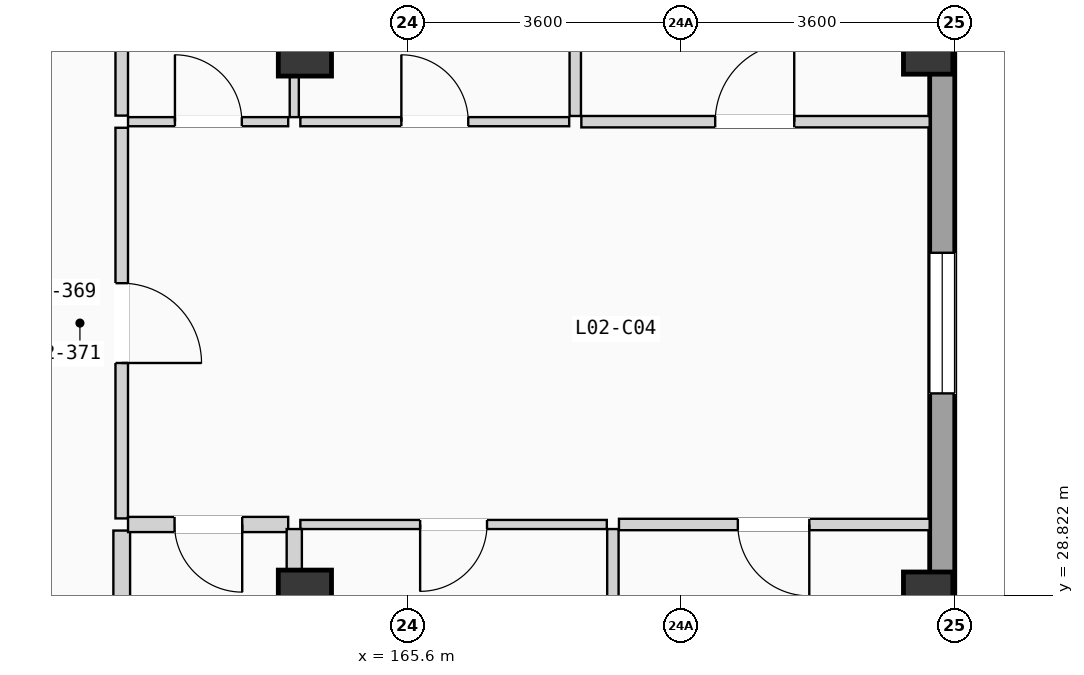
"""IFC4 building model, lengths in metres.
Left out: names, types, materials, properties, quantities, classifications, styles, units other than length and angle.
Written with IfcOpenShell. Run it as: python <this file> out.ifc"""

import sys

from ifc_helpers import new_model, si_unit, direction, frame, frame_2d, origin, origin_2d, place, context, subcontext, project, spatial, rectangle, extrude, element, fill, save


model = new_model("IFC4")
c1 = context("Model", 3, precision=1e-05, world=origin(), true_north=direction((0.0, 1.0)))
c2 = subcontext(c1, "Body", "Model", "MODEL_VIEW")
j1 = project(units=[si_unit("LENGTHUNIT", "METRE"), si_unit("PLANEANGLEUNIT", "RADIAN")], contexts=[c1])
p1 = place(None, origin())
s1 = spatial("IfcSite", under=j1, at=p1, CompositionType="ELEMENT")
p2 = place(p1, origin())
s2 = spatial("IfcBuilding", under=s1, at=p2, CompositionType="ELEMENT")
p3 = place(p2, frame((0.0, 0.0, 8.575)))
s3 = spatial("IfcBuildingStorey", under=s2, at=p3, CompositionType="ELEMENT", Elevation=8.575)
for number, where, z_axis, x_axis in (
    (1, (164.25, 28.8, 0.0), (0.0, 0.0, 1.0), (1.0, 0.0, 0.0)),
    (2, (164.25, 36.0, 0.0), (0.0, 0.0, 1.0), (1.0, 0.0, 0.0)),
):
    element("IfcColumn", number, at=place(p3, frame(where, z_axis=z_axis, x_axis=x_axis)), inside=s3, PredefinedType="COLUMN", context=c2, shape_type="SweptSolid", body=[
        extrude(rectangle(XDim=0.7, YDim=0.7, at=origin_2d()), origin(), (0.0, 0.0, 1.0), 3.5),
    ])
for number, where, z_axis, x_axis in (
    (3, (172.45, 28.8, 0.0), (0.0, 0.0, 1.0), (1.0, 0.0, 0.0)),
    (4, (172.45, 36.0, 0.0), (0.0, 0.0, 1.0), (1.0, 0.0, 0.0)),
):
    element("IfcColumn", number, at=place(p3, frame(where, z_axis=z_axis, x_axis=x_axis)), inside=s3, PredefinedType="COLUMN", context=c2, shape_type="SweptSolid", body=[
        extrude(rectangle(XDim=0.65, YDim=0.65, at=origin_2d()), origin(), (0.0, 0.0, 1.0), 3.5),
    ])
p4 = place(p3, frame((172.635, 0.33, 0.0), z_axis=(0.0, 0.0, 1.0), x_axis=(0.0, 1.0, 0.0)))
e5 = element("IfcWall", 5, at=p4, inside=s3, PredefinedType="SOLIDWALL", context=c2, shape_type="SweptSolid", body=[
    extrude(rectangle(XDim=49.74, YDim=0.33, at=frame_2d((24.87, 0.0))), origin(), (0.0, 0.0, 1.0), 3.24),
])
p5 = place(p4, frame((11.709, 0.0, 0.9)))
e6 = element("IfcOpeningElement", 6, at=p5, cuts=e5, PredefinedType="OPENING", context=c2, shape_type="SweptSolid", body=[
    extrude(rectangle(XDim=1.85, YDim=1.2, at=frame_2d((0.925, 0.6))), frame((0.0, 0.175, 0.0), z_axis=(0.0, -1.0, 0.0), x_axis=(1.0, 0.0, 0.0)), (0.0, 0.0, 1.0), 0.35),
])
p6 = place(p4, frame((8.364, 0.0, 0.9)))
e7 = element("IfcOpeningElement", 7, at=p6, cuts=e5, PredefinedType="OPENING", context=c2, shape_type="SweptSolid", body=[
    extrude(rectangle(XDim=1.85, YDim=1.35, at=frame_2d((0.925, 0.675))), frame((0.0, 0.175, 0.0), z_axis=(0.0, -1.0, 0.0), x_axis=(1.0, 0.0, 0.0)), (0.0, 0.0, 1.0), 0.35),
])
p7 = place(p4, frame((17.612, 0.0, 0.9)))
e8 = element("IfcOpeningElement", 8, at=p7, cuts=e5, PredefinedType="OPENING", context=c2, shape_type="SweptSolid", body=[
    extrude(rectangle(XDim=1.85, YDim=1.5, at=frame_2d((0.925, 0.75))), frame((0.0, 0.175, 0.0), z_axis=(0.0, -1.0, 0.0), x_axis=(1.0, 0.0, 0.0)), (0.0, 0.0, 1.0), 0.35),
])
p8 = place(p4, frame((31.145, 0.0, 0.9)))
e9 = element("IfcOpeningElement", 9, at=p8, cuts=e5, PredefinedType="OPENING", context=c2, shape_type="SweptSolid", body=[
    extrude(rectangle(XDim=1.85, YDim=1.65, at=frame_2d((0.925, 0.825))), frame((0.0, 0.175, 0.0), z_axis=(0.0, -1.0, 0.0), x_axis=(1.0, 0.0, 0.0)), (0.0, 0.0, 1.0), 0.35),
])
p9 = place(p4, frame((23.945, 0.0, 0.755)))
e10 = element("IfcOpeningElement", 10, at=p9, cuts=e5, PredefinedType="OPENING", context=c2, shape_type="SweptSolid", body=[
    extrude(rectangle(XDim=1.85, YDim=1.8, at=frame_2d((0.925, 0.9))), frame((0.0, 0.175, 0.0), z_axis=(0.0, -1.0, 0.0), x_axis=(1.0, 0.0, 0.0)), (0.0, 0.0, 1.0), 0.35),
])
p10 = place(p4, frame((38.205, 0.0, 0.9)))
e11 = element("IfcOpeningElement", 11, at=p10, cuts=e5, PredefinedType="OPENING", context=c2, shape_type="SweptSolid", body=[
    extrude(rectangle(XDim=2.0, YDim=1.2, at=frame_2d((1.0, 0.6))), frame((0.0, 0.175, 0.0), z_axis=(0.0, -1.0, 0.0), x_axis=(1.0, 0.0, 0.0)), (0.0, 0.0, 1.0), 0.35),
])
p11 = place(p3, frame((161.84, 29.83, 0.0), z_axis=(0.0, 0.0, 1.0), x_axis=(0.0, 1.0, 0.0)))
e12 = element("IfcWall", 12, at=p11, inside=s3, PredefinedType="PARTITIONING", context=c2, shape_type="SweptSolid", body=[
    extrude(rectangle(XDim=5.14, YDim=0.165, at=frame_2d((2.57, 0.0))), origin(), (0.0, 0.0, 1.0), 3.22),
])
p12 = place(p11, frame((2.045, 0.0, 0.0)))
e13 = element("IfcOpeningElement", 13, at=p12, cuts=e12, PredefinedType="OPENING", context=c2, shape_type="SweptSolid", body=[
    extrude(rectangle(XDim=1.05, YDim=2.13, at=frame_2d((0.525, 1.065))), frame((0.0, 0.093, 0.0), z_axis=(0.0, -1.0, 0.0), x_axis=(1.0, 0.0, 0.0)), (0.0, 0.0, 1.0), 0.185),
])
p13 = place(p3, frame((161.84, 21.066, 0.0), z_axis=(0.0, 0.0, 1.0), x_axis=(0.0, 1.0, 0.0)))
e14 = element("IfcWall", 14, at=p13, inside=s3, PredefinedType="PLUMBINGWALL", context=c2, shape_type="SweptSolid", body=[
    extrude(rectangle(XDim=8.604, YDim=0.22, at=frame_2d((4.302, 0.0))), origin(), (0.0, 0.0, 1.0), 3.22),
])
p14 = place(p3, frame((161.84, 35.13, 0.0), z_axis=(0.0, 0.0, 1.0), x_axis=(0.0, 1.0, 0.0)))
e15 = element("IfcWall", 15, at=p14, inside=s3, PredefinedType="PARTITIONING", context=c2, shape_type="SweptSolid", body=[
    extrude(rectangle(XDim=7.67, YDim=0.165, at=frame_2d((3.835, 0.0))), origin(), (0.0, 0.0, 1.0), 3.22),
])
p15 = place(p3, frame((161.923, 29.75, 0.0), z_axis=(0.0, 0.0, 1.0), x_axis=(1.0, 0.0, 0.0)))
e16 = element("IfcWall", 16, at=p15, inside=s3, PredefinedType="PLUMBINGWALL", context=c2, shape_type="SweptSolid", body=[
    extrude(rectangle(XDim=2.107, YDim=0.2, at=frame_2d((1.053, 0.0))), origin(), (0.0, 0.0, 1.0), 3.22),
])
p16 = place(p15, frame((0.612, 0.0, 0.0)))
e17 = element("IfcOpeningElement", 17, at=p16, cuts=e16, PredefinedType="OPENING", context=c2, shape_type="SweptSolid", body=[
    extrude(rectangle(XDim=0.89, YDim=2.03, at=frame_2d((0.445, 1.015))), frame((0.0, 0.11, 0.0), z_axis=(0.0, -1.0, 0.0), x_axis=(1.0, 0.0, 0.0)), (0.0, 0.0, 1.0), 0.22),
])
p17 = place(p3, frame((161.923, 35.05, 0.0), z_axis=(0.0, 0.0, 1.0), x_axis=(1.0, 0.0, 0.0)))
e18 = element("IfcWall", 18, at=p17, inside=s3, PredefinedType="PARTITIONING", context=c2, shape_type="SweptSolid", body=[
    extrude(rectangle(XDim=2.107, YDim=0.12, at=frame_2d((1.053, 0.0))), origin(), (0.0, 0.0, 1.0), 3.22),
])
p18 = place(p17, frame((0.617, 0.0, 0.0)))
e19 = element("IfcOpeningElement", 19, at=p18, cuts=e18, PredefinedType="OPENING", context=c2, shape_type="SweptSolid", body=[
    extrude(rectangle(XDim=0.88, YDim=2.02, at=frame_2d((0.44, 1.01))), frame((0.0, 0.07, 0.0), z_axis=(0.0, -1.0, 0.0), x_axis=(1.0, 0.0, 0.0)), (0.0, 0.0, 1.0), 0.14),
])
p19 = place(p3, frame((168.382, 29.75, 0.0), z_axis=(0.0, 0.0, 1.0), x_axis=(1.0, 0.0, 0.0)))
e20 = element("IfcWall", 20, at=p19, inside=s3, PredefinedType="PARTITIONING", context=c2, shape_type="SweptSolid", body=[
    extrude(rectangle(XDim=4.088, YDim=0.15, at=frame_2d((2.044, 0.0))), origin(), (0.0, 0.0, 1.0), 3.22),
])
p20 = place(p19, frame((1.564, 0.0, 0.0)))
e21 = element("IfcOpeningElement", 21, at=p20, cuts=e20, PredefinedType="OPENING", context=c2, shape_type="SweptSolid", body=[
    extrude(rectangle(XDim=0.94, YDim=2.06, at=frame_2d((0.47, 1.03))), frame((0.0, 0.085, 0.0), z_axis=(0.0, -1.0, 0.0), x_axis=(1.0, 0.0, 0.0)), (0.0, 0.0, 1.0), 0.17),
])
p21 = place(p3, frame((164.19, 29.75, 0.0), z_axis=(0.0, 0.0, 1.0), x_axis=(1.0, 0.0, 0.0)))
e22 = element("IfcWall", 22, at=p21, inside=s3, PredefinedType="PARTITIONING", context=c2, shape_type="SweptSolid", body=[
    extrude(rectangle(XDim=4.032, YDim=0.12, at=frame_2d((2.016, 0.0))), origin(), (0.0, 0.0, 1.0), 3.22),
])
p22 = place(p21, frame((1.576, 0.0, 0.0)))
e23 = element("IfcOpeningElement", 23, at=p22, cuts=e22, PredefinedType="OPENING", context=c2, shape_type="SweptSolid", body=[
    extrude(rectangle(XDim=0.88, YDim=2.02, at=frame_2d((0.44, 1.01))), frame((0.0, 0.07, 0.0), z_axis=(0.0, -1.0, 0.0), x_axis=(1.0, 0.0, 0.0)), (0.0, 0.0, 1.0), 0.14),
])
p23 = place(p3, frame((167.887, 35.05, 0.0), z_axis=(0.0, 0.0, 1.0), x_axis=(1.0, 0.0, 0.0)))
e24 = element("IfcWall", 24, at=p23, inside=s3, PredefinedType="PARTITIONING", context=c2, shape_type="SweptSolid", body=[
    extrude(rectangle(XDim=4.583, YDim=0.15, at=frame_2d((2.292, 0.0))), origin(), (0.0, 0.0, 1.0), 3.22),
])
p24 = place(p23, frame((1.761, 0.0, 0.0)))
e25 = element("IfcOpeningElement", 25, at=p24, cuts=e24, PredefinedType="OPENING", context=c2, shape_type="SweptSolid", body=[
    extrude(rectangle(XDim=1.04, YDim=2.08, at=frame_2d((0.52, 1.04))), frame((0.0, 0.085, 0.0), z_axis=(0.0, -1.0, 0.0), x_axis=(1.0, 0.0, 0.0)), (0.0, 0.0, 1.0), 0.17),
])
p25 = place(p3, frame((164.19, 35.05, 0.0), z_axis=(0.0, 0.0, 1.0), x_axis=(1.0, 0.0, 0.0)))
e26 = element("IfcWall", 26, at=p25, inside=s3, PredefinedType="PARTITIONING", context=c2, shape_type="SweptSolid", body=[
    extrude(rectangle(XDim=3.537, YDim=0.12, at=frame_2d((1.769, 0.0))), origin(), (0.0, 0.0, 1.0), 3.22),
])
p26 = place(p25, frame((1.329, 0.0, 0.0)))
e27 = element("IfcOpeningElement", 27, at=p26, cuts=e26, PredefinedType="OPENING", context=c2, shape_type="SweptSolid", body=[
    extrude(rectangle(XDim=0.88, YDim=2.02, at=frame_2d((0.44, 1.01))), frame((0.0, 0.07, 0.0), z_axis=(0.0, -1.0, 0.0), x_axis=(1.0, 0.0, 0.0)), (0.0, 0.0, 1.0), 0.14),
])
p27 = place(p3, frame((164.11, 21.066, 0.0), z_axis=(0.0, 0.0, 1.0), x_axis=(0.0, 1.0, 0.0)))
e28 = element("IfcWall", 28, at=p27, inside=s3, PredefinedType="PLUMBINGWALL", context=c2, shape_type="SweptSolid", body=[
    extrude(rectangle(XDim=8.624, YDim=0.2, at=frame_2d((4.312, 0.0))), origin(), (0.0, 0.0, 1.0), 3.22),
])
p28 = place(p27, frame((3.877, 0.0, 0.0)))
e29 = element("IfcOpeningElement", 29, at=p28, cuts=e28, PredefinedType="OPENING", context=c2, shape_type="SweptSolid", body=[
    extrude(rectangle(XDim=0.85, YDim=2.01, at=frame_2d((0.425, 1.005))), frame((0.0, 0.11, 0.0), z_axis=(0.0, -1.0, 0.0), x_axis=(1.0, 0.0, 0.0)), (0.0, 0.0, 1.0), 0.22),
])
p29 = place(p3, frame((164.11, 35.11, 0.0), z_axis=(0.0, 0.0, 1.0), x_axis=(0.0, 1.0, 0.0)))
e30 = element("IfcWall", 30, at=p29, inside=s3, PredefinedType="PARTITIONING", context=c2, shape_type="SweptSolid", body=[
    extrude(rectangle(XDim=7.69, YDim=0.12, at=frame_2d((3.845, 0.0))), origin(), (0.0, 0.0, 1.0), 3.22),
])
p30 = place(p3, frame((168.302, 21.066, 0.0), z_axis=(0.0, 0.0, 1.0), x_axis=(0.0, 1.0, 0.0)))
e31 = element("IfcWall", 31, at=p30, inside=s3, PredefinedType="PARTITIONING", context=c2, shape_type="SweptSolid", body=[
    extrude(rectangle(XDim=8.624, YDim=0.15, at=frame_2d((4.312, 0.0))), origin(), (0.0, 0.0, 1.0), 3.22),
])
p31 = place(p3, frame((167.807, 35.125, 0.0), z_axis=(0.0, 0.0, 1.0), x_axis=(0.0, 1.0, 0.0)))
e32 = element("IfcWall", 32, at=p31, inside=s3, PredefinedType="PARTITIONING", context=c2, shape_type="SweptSolid", body=[
    extrude(rectangle(XDim=7.675, YDim=0.15, at=frame_2d((3.837, 0.0))), origin(), (0.0, 0.0, 1.0), 3.22),
])
p32 = place(p8, origin())
e33 = element("IfcWindow", 33, at=p32, inside=s3, PartitioningType="DOUBLE_PANEL_VERTICAL", PredefinedType="WINDOW", context=c2, shape_type="SweptSolid", body=[
    extrude(rectangle(XDim=1.85, YDim=1.65, at=frame_2d((0.925, 0.825))), frame((0.0, 0.03, 0.0), z_axis=(0.0, -1.0, 0.0), x_axis=(1.0, 0.0, 0.0)), (0.0, 0.0, 1.0), 0.06),
])
fill(e9, e33)
p33 = place(p12, frame((1.05, 0.0, 0.0), z_axis=(0.0, 0.0, 1.0), x_axis=(-1.0, 0.0, 0.0)))
e34 = element("IfcDoor", 34, at=p33, inside=s3, OperationType="SINGLE_SWING_LEFT", PredefinedType="DOOR", context=c2, shape_type="SweptSolid", body=[
    extrude(rectangle(XDim=1.05, YDim=2.13, at=frame_2d((0.525, 1.065))), frame((0.0, 0.025, 0.0), z_axis=(0.0, -1.0, 0.0), x_axis=(1.0, 0.0, 0.0)), (0.0, 0.0, 1.0), 0.05),
])
fill(e13, e34)
p34 = place(p16, frame((0.89, 0.0, 0.0), z_axis=(0.0, 0.0, 1.0), x_axis=(-1.0, 0.0, 0.0)))
e35 = element("IfcDoor", 35, at=p34, inside=s3, OperationType="SINGLE_SWING_RIGHT", PredefinedType="DOOR", context=c2, shape_type="SweptSolid", body=[
    extrude(rectangle(XDim=0.89, YDim=2.03, at=frame_2d((0.445, 1.015))), frame((0.0, 0.025, 0.0), z_axis=(0.0, -1.0, 0.0), x_axis=(1.0, 0.0, 0.0)), (0.0, 0.0, 1.0), 0.05),
])
fill(e17, e35)
p35 = place(p18, origin())
e36 = element("IfcDoor", 36, at=p35, inside=s3, OperationType="SINGLE_SWING_LEFT", PredefinedType="DOOR", context=c2, shape_type="SweptSolid", body=[
    extrude(rectangle(XDim=0.88, YDim=2.02, at=frame_2d((0.44, 1.01))), frame((0.0, 0.025, 0.0), z_axis=(0.0, -1.0, 0.0), x_axis=(1.0, 0.0, 0.0)), (0.0, 0.0, 1.0), 0.05),
])
fill(e19, e36)
p36 = place(p20, frame((0.94, 0.0, 0.0), z_axis=(0.0, 0.0, 1.0), x_axis=(-1.0, 0.0, 0.0)))
e37 = element("IfcDoor", 37, at=p36, inside=s3, OperationType="SINGLE_SWING_RIGHT", PredefinedType="DOOR", context=c2, shape_type="SweptSolid", body=[
    extrude(rectangle(XDim=0.94, YDim=2.06, at=frame_2d((0.47, 1.03))), frame((0.0, 0.025, 0.0), z_axis=(0.0, -1.0, 0.0), x_axis=(1.0, 0.0, 0.0)), (0.0, 0.0, 1.0), 0.05),
])
fill(e21, e37)
p37 = place(p22, frame((0.88, 0.0, 0.0), z_axis=(0.0, 0.0, 1.0), x_axis=(-1.0, 0.0, 0.0)))
e38 = element("IfcDoor", 38, at=p37, inside=s3, OperationType="SINGLE_SWING_LEFT", PredefinedType="DOOR", context=c2, shape_type="SweptSolid", body=[
    extrude(rectangle(XDim=0.88, YDim=2.02, at=frame_2d((0.44, 1.01))), frame((0.0, 0.025, 0.0), z_axis=(0.0, -1.0, 0.0), x_axis=(1.0, 0.0, 0.0)), (0.0, 0.0, 1.0), 0.05),
])
fill(e23, e38)
p38 = place(p24, origin())
e39 = element("IfcDoor", 39, at=p38, inside=s3, OperationType="SINGLE_SWING_RIGHT", PredefinedType="DOOR", context=c2, shape_type="SweptSolid", body=[
    extrude(rectangle(XDim=1.04, YDim=2.08, at=frame_2d((0.52, 1.04))), frame((0.0, 0.025, 0.0), z_axis=(0.0, -1.0, 0.0), x_axis=(1.0, 0.0, 0.0)), (0.0, 0.0, 1.0), 0.05),
])
fill(e25, e39)
p39 = place(p26, origin())
e40 = element("IfcDoor", 40, at=p39, inside=s3, OperationType="SINGLE_SWING_LEFT", PredefinedType="DOOR", context=c2, shape_type="SweptSolid", body=[
    extrude(rectangle(XDim=0.88, YDim=2.02, at=frame_2d((0.44, 1.01))), frame((0.0, 0.025, 0.0), z_axis=(0.0, -1.0, 0.0), x_axis=(1.0, 0.0, 0.0)), (0.0, 0.0, 1.0), 0.05),
])
fill(e27, e40)
save(model, sys.argv[1])
